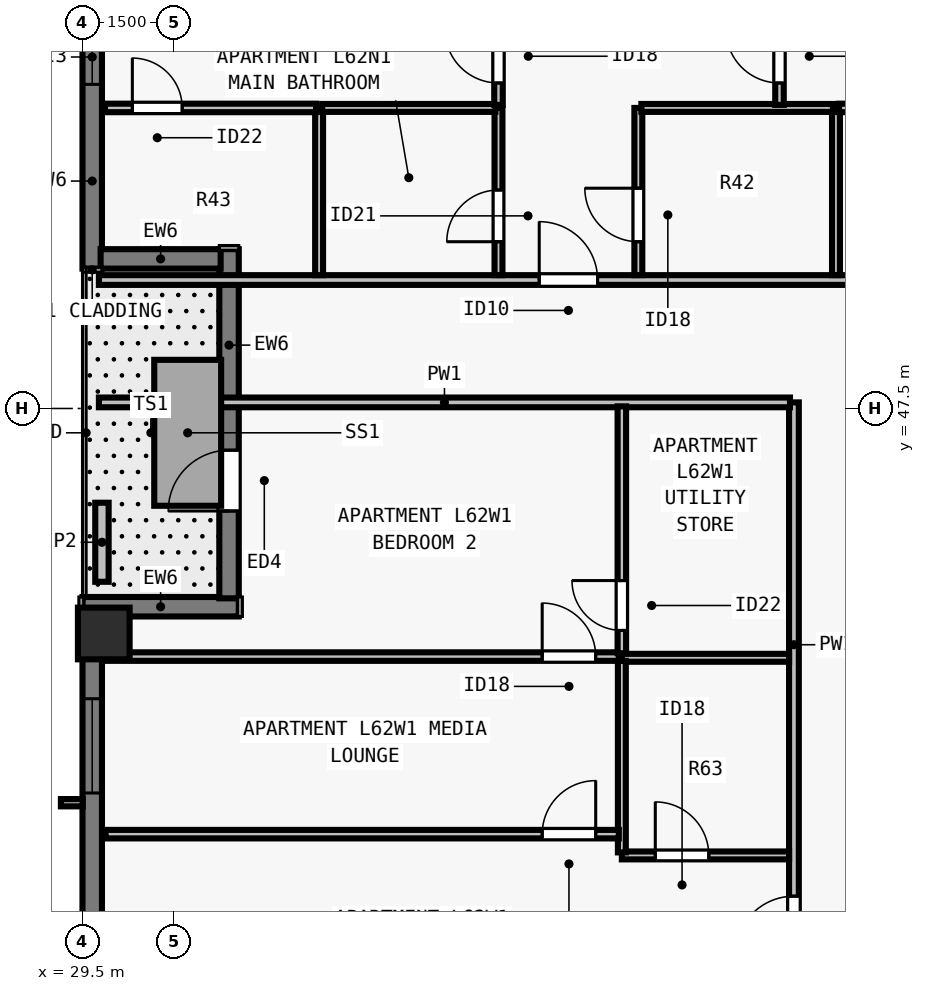
"""IFC4 building model, lengths in metres.
Left out: names, types, materials, properties, quantities, classifications, styles, units other than length and angle.
Written with IfcOpenShell. Run it as: python <this file> out.ifc"""

import sys

from ifc_helpers import new_model, si_unit, direction, frame, frame_2d, origin, origin_2d, place, context, subcontext, project, spatial, rectangle, extrude, element, fill, save


model = new_model("IFC4")
c1 = context("Model", 3, precision=1e-05, world=origin(), true_north=direction((0.0, 1.0)))
c2 = subcontext(c1, "Body", "Model", "MODEL_VIEW")
j1 = project(units=[si_unit("LENGTHUNIT", "METRE"), si_unit("PLANEANGLEUNIT", "RADIAN")], contexts=[c1])
p1 = place(None, origin())
s1 = spatial("IfcSite", under=j1, at=p1, CompositionType="ELEMENT")
p2 = place(p1, origin())
s2 = spatial("IfcBuilding", under=s1, at=p2, CompositionType="ELEMENT")
p3 = place(p2, frame((0.0, 0.0, 227.0)))
s3 = spatial("IfcBuildingStorey", under=s2, at=p3, CompositionType="ELEMENT", Elevation=227.0)
p4 = place(p3, frame((29.85, 43.8, 0.0), z_axis=(0.0, 0.0, 1.0), x_axis=(0.0, 1.0, 0.0)))
e1 = element("IfcColumn", 1, at=p4, inside=s3, PredefinedType="COLUMN", context=c2, shape_type="SweptSolid", body=[
    extrude(rectangle(XDim=0.85, YDim=0.85, at=origin_2d()), origin(), (0.0, 0.0, 1.0), 3.5),
])
p5 = place(p3, frame((29.66, 49.8, 0.0), z_axis=(0.0, 0.0, 1.0), x_axis=(0.0, 1.0, 0.0)))
e2 = element("IfcWall", 2, at=p5, inside=s3, PredefinedType="SOLIDWALL", context=c2, shape_type="SweptSolid", body=[
    extrude(rectangle(XDim=6.402, YDim=0.32, at=frame_2d((3.201, 0.0))), origin(), (0.0, 0.0, 1.0), 3.29),
])
p6 = place(p5, frame((3.03, 0.0, 0.8)))
e3 = element("IfcOpeningElement", 3, at=p6, cuts=e2, PredefinedType="OPENING", context=c2, shape_type="SweptSolid", body=[
    extrude(rectangle(XDim=0.9, YDim=1.678, at=frame_2d((0.45, 0.839))), frame((0.0, 0.17, 0.0), z_axis=(0.0, -1.0, 0.0), x_axis=(1.0, 0.0, 0.0)), (0.0, 0.0, 1.0), 0.34),
])
p7 = place(p3, frame((29.66, 21.5, 0.0), z_axis=(0.0, 0.0, 1.0), x_axis=(0.0, 1.0, 0.0)))
e4 = element("IfcWall", 4, at=p7, inside=s3, PredefinedType="SOLIDWALL", context=c2, shape_type="SweptSolid", body=[
    extrude(rectangle(XDim=22.602, YDim=0.32, at=frame_2d((11.301, 0.0))), origin(), (0.0, 0.0, 1.0), 3.29),
])
p8 = place(p7, frame((4.825, 0.0, 0.8)))
e5 = element("IfcOpeningElement", 5, at=p8, cuts=e4, PredefinedType="OPENING", context=c2, shape_type="SweptSolid", body=[
    extrude(rectangle(XDim=1.55, YDim=1.678, at=frame_2d((0.775, 0.839))), frame((0.0, 0.17, 0.0), z_axis=(0.0, -1.0, 0.0), x_axis=(1.0, 0.0, 0.0)), (0.0, 0.0, 1.0), 0.34),
])
p9 = place(p7, frame((9.426, 0.0, 0.8)))
e6 = element("IfcOpeningElement", 6, at=p9, cuts=e4, PredefinedType="OPENING", context=c2, shape_type="SweptSolid", body=[
    extrude(rectangle(XDim=1.85, YDim=1.678, at=frame_2d((0.925, 0.839))), frame((0.0, 0.17, 0.0), z_axis=(0.0, -1.0, 0.0), x_axis=(1.0, 0.0, 0.0)), (0.0, 0.0, 1.0), 0.34),
])
p10 = place(p7, frame((15.177, 0.0, 0.8)))
e7 = element("IfcOpeningElement", 7, at=p10, cuts=e4, PredefinedType="OPENING", context=c2, shape_type="SweptSolid", body=[
    extrude(rectangle(XDim=1.85, YDim=1.678, at=frame_2d((0.925, 0.839))), frame((0.0, 0.17, 0.0), z_axis=(0.0, -1.0, 0.0), x_axis=(1.0, 0.0, 0.0)), (0.0, 0.0, 1.0), 0.34),
])
p11 = place(p7, frame((19.677, 0.0, 0.8)))
e8 = element("IfcOpeningElement", 8, at=p11, cuts=e4, PredefinedType="OPENING", context=c2, shape_type="SweptSolid", body=[
    extrude(rectangle(XDim=1.55, YDim=1.678, at=frame_2d((0.775, 0.839))), frame((0.0, 0.17, 0.0), z_axis=(0.0, -1.0, 0.0), x_axis=(1.0, 0.0, 0.0)), (0.0, 0.0, 1.0), 0.34),
])
p12 = place(p3, frame((29.5, 44.24, 0.0), z_axis=(0.0, 0.0, 1.0), x_axis=(1.0, 0.0, 0.0)))
e9 = element("IfcWall", 9, at=p12, inside=s3, PredefinedType="SOLIDWALL", context=c2, shape_type="SweptSolid", body=[
    extrude(rectangle(XDim=2.57, YDim=0.32, at=frame_2d((1.285, 0.0))), origin(), (0.0, 0.0, 1.0), 3.29),
])
p13 = place(p3, frame((31.91, 44.378, 0.0), z_axis=(0.0, 0.0, 1.0), x_axis=(0.0, 1.0, 0.0)))
e10 = element("IfcWall", 10, at=p13, inside=s3, PredefinedType="SOLIDWALL", context=c2, shape_type="SweptSolid", body=[
    extrude(rectangle(XDim=5.742, YDim=0.32, at=frame_2d((2.871, 0.0))), origin(), (0.0, 0.0, 1.0), 3.29),
])
p14 = place(p13, frame((1.436, 0.0, 0.0)))
e11 = element("IfcOpeningElement", 11, at=p14, cuts=e10, PredefinedType="OPENING", context=c2, shape_type="SweptSolid", body=[
    extrude(rectangle(XDim=1.0, YDim=2.15, at=frame_2d((0.5, 1.075))), frame((0.0, 0.17, 0.0), z_axis=(0.0, -1.0, 0.0), x_axis=(1.0, 0.0, 0.0)), (0.0, 0.0, 1.0), 0.34),
])
p15 = place(p3, frame((31.772, 49.96, 0.0), z_axis=(0.0, 0.0, 1.0), x_axis=(-1.0, 0.0, 0.0)))
e12 = element("IfcWall", 12, at=p15, inside=s3, PredefinedType="SOLIDWALL", context=c2, shape_type="SweptSolid", body=[
    extrude(rectangle(XDim=1.974, YDim=0.32, at=frame_2d((0.987, 0.0))), origin(), (0.0, 0.0, 1.0), 3.29),
])
p16 = place(p3, frame((29.82, 44.65, 0.0), z_axis=(0.0, 0.0, 1.0), x_axis=(0.0, 1.0, 0.0)))
e13 = element("IfcWall", 13, at=p16, inside=s3, PredefinedType="PARAPET", context=c2, shape_type="SweptSolid", body=[
    extrude(rectangle(XDim=1.3, YDim=0.22, at=frame_2d((0.65, 0.0))), origin(), (0.0, 0.0, 1.0), 0.55),
])
p17 = place(p3, frame((29.77, 49.613, 0.0), z_axis=(0.0, 0.0, 1.0), x_axis=(1.0, 0.0, 0.0)))
e14 = element("IfcWall", 14, at=p17, inside=s3, PredefinedType="PARTITIONING", context=c2, shape_type="SweptSolid", body=[
    extrude(rectangle(XDim=44.425, YDim=0.16, at=frame_2d((22.212, 0.0))), origin(), (0.0, 0.0, 1.0), 2.958),
])
p18 = place(p17, frame((7.241, 0.0, 0.0)))
e15 = element("IfcOpeningElement", 15, at=p18, cuts=e14, PredefinedType="OPENING", context=c2, shape_type="SweptSolid", body=[
    extrude(rectangle(XDim=0.96, YDim=2.18, at=frame_2d((0.48, 1.09))), frame((0.0, 0.09, 0.0), z_axis=(0.0, -1.0, 0.0), x_axis=(1.0, 0.0, 0.0)), (0.0, 0.0, 1.0), 0.18),
])
p19 = place(p17, frame((21.815, 0.0, 0.0)))
e16 = element("IfcOpeningElement", 16, at=p19, cuts=e14, PredefinedType="OPENING", context=c2, shape_type="SweptSolid", body=[
    extrude(rectangle(XDim=0.96, YDim=2.18, at=frame_2d((0.48, 1.09))), frame((0.0, 0.09, 0.0), z_axis=(0.0, -1.0, 0.0), x_axis=(1.0, 0.0, 0.0)), (0.0, 0.0, 1.0), 0.18),
])
p20 = place(p17, frame((36.324, 0.0, 0.0)))
e17 = element("IfcOpeningElement", 17, at=p20, cuts=e14, PredefinedType="OPENING", context=c2, shape_type="SweptSolid", body=[
    extrude(rectangle(XDim=0.96, YDim=2.18, at=frame_2d((0.48, 1.09))), frame((0.0, 0.09, 0.0), z_axis=(0.0, -1.0, 0.0), x_axis=(1.0, 0.0, 0.0)), (0.0, 0.0, 1.0), 0.18),
])
p21 = place(p3, frame((41.2, 30.4, 0.0), z_axis=(0.0, 0.0, 1.0), x_axis=(0.0, 1.0, 0.0)))
e18 = element("IfcWall", 18, at=p21, inside=s3, PredefinedType="PARTITIONING", context=c2, shape_type="SweptSolid", body=[
    extrude(rectangle(XDim=17.2, YDim=0.16, at=frame_2d((8.6, 0.0))), origin(), (0.0, 0.0, 1.0), 3.29),
])
p22 = place(p21, frame((8.12, 0.0, 0.0)))
e19 = element("IfcOpeningElement", 19, at=p22, cuts=e18, PredefinedType="OPENING", context=c2, shape_type="SweptSolid", body=[
    extrude(rectangle(XDim=0.96, YDim=2.18, at=frame_2d((0.48, 1.09))), frame((0.0, 0.09, 0.0), z_axis=(0.0, -1.0, 0.0), x_axis=(1.0, 0.0, 0.0)), (0.0, 0.0, 1.0), 0.18),
])
p23 = place(p3, frame((29.77, 47.6, 0.0), z_axis=(0.0, 0.0, 1.0), x_axis=(1.0, 0.0, 0.0)))
e20 = element("IfcWall", 20, at=p23, inside=s3, PredefinedType="PARTITIONING", context=c2, shape_type="SweptSolid", body=[
    extrude(rectangle(XDim=11.365, YDim=0.16, at=frame_2d((5.683, 0.0))), origin(), (0.0, 0.0, 1.0), 3.29),
])
p24 = place(p3, frame((33.391, 49.692, 0.0), z_axis=(0.0, 0.0, 1.0), x_axis=(0.0, 1.0, 0.0)))
e21 = element("IfcWall", 21, at=p24, inside=s3, PredefinedType="PLUMBINGWALL", context=c2, shape_type="SweptSolid", body=[
    extrude(rectangle(XDim=2.75, YDim=0.13, at=frame_2d((1.375, 0.0))), origin(), (0.0, 0.0, 1.0), 3.29),
])
p25 = place(p3, frame((36.341, 49.692, 0.0), z_axis=(0.0, 0.0, 1.0), x_axis=(0.0, 1.0, 0.0)))
e22 = element("IfcWall", 22, at=p25, inside=s3, PredefinedType="PLUMBINGWALL", context=c2, shape_type="SweptSolid", body=[
    extrude(rectangle(XDim=2.75, YDim=0.13, at=frame_2d((1.375, 0.0))), origin(), (0.0, 0.0, 1.0), 3.29),
])
p26 = place(p25, frame((0.55, 0.0, 0.0)))
e23 = element("IfcOpeningElement", 23, at=p26, cuts=e22, PredefinedType="OPENING", context=c2, shape_type="SweptSolid", body=[
    extrude(rectangle(XDim=0.85, YDim=2.08, at=frame_2d((0.425, 1.04))), frame((0.0, 0.075, 0.0), z_axis=(0.0, -1.0, 0.0), x_axis=(1.0, 0.0, 0.0)), (0.0, 0.0, 1.0), 0.15),
])
p27 = place(p3, frame((33.441, 52.442, 0.0), z_axis=(0.0, 0.0, 1.0), x_axis=(1.0, 0.0, 0.0)))
e24 = element("IfcWall", 24, at=p27, inside=s3, PredefinedType="PLUMBINGWALL", context=c2, shape_type="SweptSolid", body=[
    extrude(rectangle(XDim=2.85, YDim=0.13, at=frame_2d((1.425, 0.0))), origin(), (0.0, 0.0, 1.0), 2.958),
])
p28 = place(p3, frame((41.891, 49.692, 0.0), z_axis=(0.0, 0.0, 1.0), x_axis=(0.0, 1.0, 0.0)))
e25 = element("IfcWall", 25, at=p28, inside=s3, PredefinedType="PLUMBINGWALL", context=c2, shape_type="SweptSolid", body=[
    extrude(rectangle(XDim=2.75, YDim=0.13, at=frame_2d((1.375, 0.0))), origin(), (0.0, 0.0, 1.0), 2.573),
])
p29 = place(p3, frame((38.641, 49.692, 0.0), z_axis=(0.0, 0.0, 1.0), x_axis=(0.0, 1.0, 0.0)))
e26 = element("IfcWall", 26, at=p29, inside=s3, PredefinedType="PLUMBINGWALL", context=c2, shape_type="SweptSolid", body=[
    extrude(rectangle(XDim=2.75, YDim=0.13, at=frame_2d((1.375, 0.0))), origin(), (0.0, 0.0, 1.0), 3.29),
])
p30 = place(p29, frame((0.55, 0.0, 0.0)))
e27 = element("IfcOpeningElement", 27, at=p30, cuts=e26, PredefinedType="OPENING", context=c2, shape_type="SweptSolid", body=[
    extrude(rectangle(XDim=0.88, YDim=2.1, at=frame_2d((0.44, 1.05))), frame((0.0, 0.075, 0.0), z_axis=(0.0, -1.0, 0.0), x_axis=(1.0, 0.0, 0.0)), (0.0, 0.0, 1.0), 0.15),
])
p31 = place(p3, frame((38.691, 52.442, 0.0), z_axis=(0.0, 0.0, 1.0), x_axis=(1.0, 0.0, 0.0)))
e28 = element("IfcWall", 28, at=p31, inside=s3, PredefinedType="PLUMBINGWALL", context=c2, shape_type="SweptSolid", body=[
    extrude(rectangle(XDim=3.15, YDim=0.13, at=frame_2d((1.575, 0.0))), origin(), (0.0, 0.0, 1.0), 3.29),
])
p32 = place(p3, frame((36.341, 52.492, 0.0), z_axis=(0.0, 0.0, 1.0), x_axis=(0.0, 1.0, 0.0)))
e29 = element("IfcWall", 29, at=p32, inside=s3, PredefinedType="PARTITIONING", context=c2, shape_type="SweptSolid", body=[
    extrude(rectangle(XDim=8.628, YDim=0.14, at=frame_2d((4.314, 0.0))), origin(), (0.0, 0.0, 1.0), 2.573),
])
p33 = place(p32, frame((0.36, 0.0, 0.0)))
e30 = element("IfcOpeningElement", 30, at=p33, cuts=e29, PredefinedType="OPENING", context=c2, shape_type="SweptSolid", body=[
    extrude(rectangle(XDim=0.88, YDim=2.1, at=frame_2d((0.44, 1.05))), frame((0.0, 0.08, 0.0), z_axis=(0.0, -1.0, 0.0), x_axis=(1.0, 0.0, 0.0)), (0.0, 0.0, 1.0), 0.16),
])
p34 = place(p3, frame((29.87, 52.442, 0.0), z_axis=(0.0, 0.0, 1.0), x_axis=(1.0, 0.0, 0.0)))
e31 = element("IfcWall", 31, at=p34, inside=s3, PredefinedType="PARTITIONING", context=c2, shape_type="SweptSolid", body=[
    extrude(rectangle(XDim=3.471, YDim=0.14, at=frame_2d((1.736, 0.0))), origin(), (0.0, 0.0, 1.0), 3.29),
])
p35 = place(p34, frame((0.45, 0.0, 0.0)))
e32 = element("IfcOpeningElement", 32, at=p35, cuts=e31, PredefinedType="OPENING", context=c2, shape_type="SweptSolid", body=[
    extrude(rectangle(XDim=0.82, YDim=2.1, at=frame_2d((0.41, 1.05))), frame((0.0, 0.08, 0.0), z_axis=(0.0, -1.0, 0.0), x_axis=(1.0, 0.0, 0.0)), (0.0, 0.0, 1.0), 0.16),
])
p36 = place(p3, frame((40.962, 52.492, 0.0), z_axis=(0.0, 0.0, 1.0), x_axis=(0.0, 1.0, 0.0)))
e33 = element("IfcWall", 33, at=p36, inside=s3, PredefinedType="PARTITIONING", context=c2, shape_type="SweptSolid", body=[
    extrude(rectangle(XDim=8.628, YDim=0.14, at=frame_2d((4.314, 0.0))), origin(), (0.0, 0.0, 1.0), 3.29),
])
p37 = place(p36, frame((0.36, 0.0, 0.0)))
e34 = element("IfcOpeningElement", 34, at=p37, cuts=e33, PredefinedType="OPENING", context=c2, shape_type="SweptSolid", body=[
    extrude(rectangle(XDim=0.88, YDim=2.1, at=frame_2d((0.44, 1.05))), frame((0.0, 0.08, 0.0), z_axis=(0.0, -1.0, 0.0), x_axis=(1.0, 0.0, 0.0)), (0.0, 0.0, 1.0), 0.16),
])
p38 = place(p3, frame((41.941, 52.442, 0.0), z_axis=(0.0, 0.0, 1.0), x_axis=(1.0, 0.0, 0.0)))
e35 = element("IfcWall", 35, at=p38, inside=s3, PredefinedType="PARTITIONING", context=c2, shape_type="SweptSolid", body=[
    extrude(rectangle(XDim=3.171, YDim=0.14, at=frame_2d((1.586, 0.0))), origin(), (0.0, 0.0, 1.0), 3.29),
])
p39 = place(p38, frame((0.4, 0.0, 0.0)))
e36 = element("IfcOpeningElement", 36, at=p39, cuts=e35, PredefinedType="OPENING", context=c2, shape_type="SweptSolid", body=[
    extrude(rectangle(XDim=0.82, YDim=2.1, at=frame_2d((0.41, 1.05))), frame((0.0, 0.08, 0.0), z_axis=(0.0, -1.0, 0.0), x_axis=(1.0, 0.0, 0.0)), (0.0, 0.0, 1.0), 0.16),
])
p40 = place(p3, frame((38.37, 43.4, 0.0), z_axis=(0.0, 0.0, 1.0), x_axis=(1.0, 0.0, 0.0)))
e37 = element("IfcWall", 37, at=p40, inside=s3, PredefinedType="PLUMBINGWALL", context=c2, shape_type="SweptSolid", body=[
    extrude(rectangle(XDim=2.75, YDim=0.13, at=frame_2d((1.375, 0.0))), origin(), (0.0, 0.0, 1.0), 2.958),
])
p41 = place(p3, frame((38.37, 40.15, 0.0), z_axis=(0.0, 0.0, 1.0), x_axis=(1.0, 0.0, 0.0)))
e38 = element("IfcWall", 38, at=p41, inside=s3, PredefinedType="PLUMBINGWALL", context=c2, shape_type="SweptSolid", body=[
    extrude(rectangle(XDim=2.75, YDim=0.13, at=frame_2d((1.375, 0.0))), origin(), (0.0, 0.0, 1.0), 3.29),
])
p42 = place(p41, frame((0.55, 0.0, 0.0)))
e39 = element("IfcOpeningElement", 39, at=p42, cuts=e38, PredefinedType="OPENING", context=c2, shape_type="SweptSolid", body=[
    extrude(rectangle(XDim=0.88, YDim=2.1, at=frame_2d((0.44, 1.05))), frame((0.0, 0.075, 0.0), z_axis=(0.0, -1.0, 0.0), x_axis=(1.0, 0.0, 0.0)), (0.0, 0.0, 1.0), 0.15),
])
p43 = place(p3, frame((38.37, 40.2, 0.0), z_axis=(0.0, 0.0, 1.0), x_axis=(0.0, 1.0, 0.0)))
e40 = element("IfcWall", 40, at=p43, inside=s3, PredefinedType="PLUMBINGWALL", context=c2, shape_type="SweptSolid", body=[
    extrude(rectangle(XDim=3.15, YDim=0.13, at=frame_2d((1.575, 0.0))), origin(), (0.0, 0.0, 1.0), 3.29),
])
p44 = place(p3, frame((29.88, 43.42, 0.0), z_axis=(0.0, 0.0, 1.0), x_axis=(1.0, 0.0, 0.0)))
e41 = element("IfcWall", 41, at=p44, inside=s3, PredefinedType="PARTITIONING", context=c2, shape_type="SweptSolid", body=[
    extrude(rectangle(XDim=8.44, YDim=0.14, at=frame_2d((4.22, 0.0))), origin(), (0.0, 0.0, 1.0), 3.29),
])
p45 = place(p44, frame((7.18, 0.0, 0.0)))
e42 = element("IfcOpeningElement", 42, at=p45, cuts=e41, PredefinedType="OPENING", context=c2, shape_type="SweptSolid", body=[
    extrude(rectangle(XDim=0.88, YDim=2.1, at=frame_2d((0.44, 1.05))), frame((0.0, 0.08, 0.0), z_axis=(0.0, -1.0, 0.0), x_axis=(1.0, 0.0, 0.0)), (0.0, 0.0, 1.0), 0.16),
])
p46 = place(p3, frame((38.37, 43.475, 0.0), z_axis=(0.0, 0.0, 1.0), x_axis=(0.0, 1.0, 0.0)))
e43 = element("IfcWall", 43, at=p46, inside=s3, PredefinedType="PARTITIONING", context=c2, shape_type="SweptSolid", body=[
    extrude(rectangle(XDim=4.06, YDim=0.14, at=frame_2d((2.03, 0.0))), origin(), (0.0, 0.0, 1.0), 3.29),
])
p47 = place(p46, frame((0.375, 0.0, 0.0)))
e44 = element("IfcOpeningElement", 44, at=p47, cuts=e43, PredefinedType="OPENING", context=c2, shape_type="SweptSolid", body=[
    extrude(rectangle(XDim=0.82, YDim=2.1, at=frame_2d((0.41, 1.05))), frame((0.0, 0.08, 0.0), z_axis=(0.0, -1.0, 0.0), x_axis=(1.0, 0.0, 0.0)), (0.0, 0.0, 1.0), 0.16),
])
p48 = place(p3, frame((29.88, 40.5, 0.0), z_axis=(0.0, 0.0, 1.0), x_axis=(1.0, 0.0, 0.0)))
e45 = element("IfcWall", 45, at=p48, inside=s3, PredefinedType="PARTITIONING", context=c2, shape_type="SweptSolid", body=[
    extrude(rectangle(XDim=8.44, YDim=0.14, at=frame_2d((4.22, 0.0))), origin(), (0.0, 0.0, 1.0), 2.958),
])
p49 = place(p48, frame((7.18, 0.0, 0.0)))
e46 = element("IfcOpeningElement", 46, at=p49, cuts=e45, PredefinedType="OPENING", context=c2, shape_type="SweptSolid", body=[
    extrude(rectangle(XDim=0.88, YDim=2.1, at=frame_2d((0.44, 1.05))), frame((0.0, 0.08, 0.0), z_axis=(0.0, -1.0, 0.0), x_axis=(1.0, 0.0, 0.0)), (0.0, 0.0, 1.0), 0.16),
])
p50 = place(p11, origin())
e47 = element("IfcWindow", 47, at=p50, inside=s3, PartitioningType="SINGLE_PANEL", PredefinedType="WINDOW", context=c2, shape_type="SweptSolid", body=[
    extrude(rectangle(XDim=1.55, YDim=1.678, at=frame_2d((0.775, 0.839))), frame((0.0, -0.05, 0.0), z_axis=(0.0, -1.0, 0.0), x_axis=(1.0, 0.0, 0.0)), (0.0, 0.0, 1.0), 0.06),
])
fill(e8, e47)
p51 = place(p14, origin())
e48 = element("IfcDoor", 48, at=p51, inside=s3, OperationType="SINGLE_SWING_LEFT", PredefinedType="DOOR", context=c2, shape_type="SweptSolid", body=[
    extrude(rectangle(XDim=1.0, YDim=2.15, at=frame_2d((0.5, 1.075))), frame((0.0, 0.025, 0.0), z_axis=(0.0, -1.0, 0.0), x_axis=(1.0, 0.0, 0.0)), (0.0, 0.0, 1.0), 0.05),
])
fill(e11, e48)
p52 = place(p6, origin())
e49 = element("IfcWindow", 49, at=p52, inside=s3, PartitioningType="SINGLE_PANEL", PredefinedType="WINDOW", context=c2, shape_type="SweptSolid", body=[
    extrude(rectangle(XDim=0.9, YDim=1.678, at=frame_2d((0.45, 0.839))), frame((0.0, -0.04, 0.0), z_axis=(0.0, -1.0, 0.0), x_axis=(1.0, 0.0, 0.0)), (0.0, 0.0, 1.0), 0.06),
])
fill(e3, e49)
p53 = place(p26, origin())
e50 = element("IfcDoor", 50, at=p53, inside=s3, OperationType="SINGLE_SWING_LEFT", PredefinedType="DOOR", context=c2, shape_type="SweptSolid", body=[
    extrude(rectangle(XDim=0.85, YDim=2.08, at=frame_2d((0.425, 1.04))), frame((0.0, 0.025, 0.0), z_axis=(0.0, -1.0, 0.0), x_axis=(1.0, 0.0, 0.0)), (0.0, 0.0, 1.0), 0.05),
])
fill(e23, e50)
p54 = place(p30, origin())
e51 = element("IfcDoor", 51, at=p54, inside=s3, OperationType="SINGLE_SWING_RIGHT", PredefinedType="DOOR", context=c2, shape_type="SweptSolid", body=[
    extrude(rectangle(XDim=0.88, YDim=2.1, at=frame_2d((0.44, 1.05))), frame((0.0, 0.025, 0.0), z_axis=(0.0, -1.0, 0.0), x_axis=(1.0, 0.0, 0.0)), (0.0, 0.0, 1.0), 0.05),
])
fill(e27, e51)
p55 = place(p35, origin())
e52 = element("IfcDoor", 52, at=p55, inside=s3, OperationType="SINGLE_SWING_LEFT", PredefinedType="DOOR", context=c2, shape_type="SweptSolid", body=[
    extrude(rectangle(XDim=0.82, YDim=2.1, at=frame_2d((0.41, 1.05))), frame((0.0, 0.025, 0.0), z_axis=(0.0, -1.0, 0.0), x_axis=(1.0, 0.0, 0.0)), (0.0, 0.0, 1.0), 0.05),
])
fill(e32, e52)
p56 = place(p33, origin())
e53 = element("IfcDoor", 53, at=p56, inside=s3, OperationType="SINGLE_SWING_RIGHT", PredefinedType="DOOR", context=c2, shape_type="SweptSolid", body=[
    extrude(rectangle(XDim=0.88, YDim=2.1, at=frame_2d((0.44, 1.05))), frame((0.0, 0.025, 0.0), z_axis=(0.0, -1.0, 0.0), x_axis=(1.0, 0.0, 0.0)), (0.0, 0.0, 1.0), 0.05),
])
fill(e30, e53)
p57 = place(p37, origin())
e54 = element("IfcDoor", 54, at=p57, inside=s3, OperationType="SINGLE_SWING_RIGHT", PredefinedType="DOOR", context=c2, shape_type="SweptSolid", body=[
    extrude(rectangle(XDim=0.88, YDim=2.1, at=frame_2d((0.44, 1.05))), frame((0.0, 0.025, 0.0), z_axis=(0.0, -1.0, 0.0), x_axis=(1.0, 0.0, 0.0)), (0.0, 0.0, 1.0), 0.05),
])
fill(e34, e54)
p58 = place(p18, origin())
e55 = element("IfcDoor", 55, at=p58, inside=s3, OperationType="SINGLE_SWING_LEFT", PredefinedType="DOOR", context=c2, shape_type="SweptSolid", body=[
    extrude(rectangle(XDim=0.96, YDim=2.18, at=frame_2d((0.48, 1.09))), frame((0.0, 0.025, 0.0), z_axis=(0.0, -1.0, 0.0), x_axis=(1.0, 0.0, 0.0)), (0.0, 0.0, 1.0), 0.05),
])
fill(e15, e55)
p59 = place(p42, origin())
e56 = element("IfcDoor", 56, at=p59, inside=s3, OperationType="SINGLE_SWING_LEFT", PredefinedType="DOOR", context=c2, shape_type="SweptSolid", body=[
    extrude(rectangle(XDim=0.88, YDim=2.1, at=frame_2d((0.44, 1.05))), frame((0.0, 0.025, 0.0), z_axis=(0.0, -1.0, 0.0), x_axis=(1.0, 0.0, 0.0)), (0.0, 0.0, 1.0), 0.05),
])
fill(e39, e56)
p60 = place(p47, origin())
e57 = element("IfcDoor", 57, at=p60, inside=s3, OperationType="SINGLE_SWING_RIGHT", PredefinedType="DOOR", context=c2, shape_type="SweptSolid", body=[
    extrude(rectangle(XDim=0.82, YDim=2.1, at=frame_2d((0.41, 1.05))), frame((0.0, 0.025, 0.0), z_axis=(0.0, -1.0, 0.0), x_axis=(1.0, 0.0, 0.0)), (0.0, 0.0, 1.0), 0.05),
])
fill(e44, e57)
p61 = place(p45, origin())
e58 = element("IfcDoor", 58, at=p61, inside=s3, OperationType="SINGLE_SWING_LEFT", PredefinedType="DOOR", context=c2, shape_type="SweptSolid", body=[
    extrude(rectangle(XDim=0.88, YDim=2.1, at=frame_2d((0.44, 1.05))), frame((0.0, 0.025, 0.0), z_axis=(0.0, -1.0, 0.0), x_axis=(1.0, 0.0, 0.0)), (0.0, 0.0, 1.0), 0.05),
])
fill(e42, e58)
p62 = place(p49, origin())
e59 = element("IfcDoor", 59, at=p62, inside=s3, OperationType="SINGLE_SWING_RIGHT", PredefinedType="DOOR", context=c2, shape_type="SweptSolid", body=[
    extrude(rectangle(XDim=0.88, YDim=2.1, at=frame_2d((0.44, 1.05))), frame((0.0, 0.025, 0.0), z_axis=(0.0, -1.0, 0.0), x_axis=(1.0, 0.0, 0.0)), (0.0, 0.0, 1.0), 0.05),
])
fill(e46, e59)
p63 = place(p22, origin())
e60 = element("IfcDoor", 60, at=p63, inside=s3, OperationType="SINGLE_SWING_LEFT", PredefinedType="DOOR", context=c2, shape_type="SweptSolid", body=[
    extrude(rectangle(XDim=0.96, YDim=2.18, at=frame_2d((0.48, 1.09))), frame((0.0, 0.025, 0.0), z_axis=(0.0, -1.0, 0.0), x_axis=(1.0, 0.0, 0.0)), (0.0, 0.0, 1.0), 0.05),
])
fill(e19, e60)
save(model, sys.argv[1])
